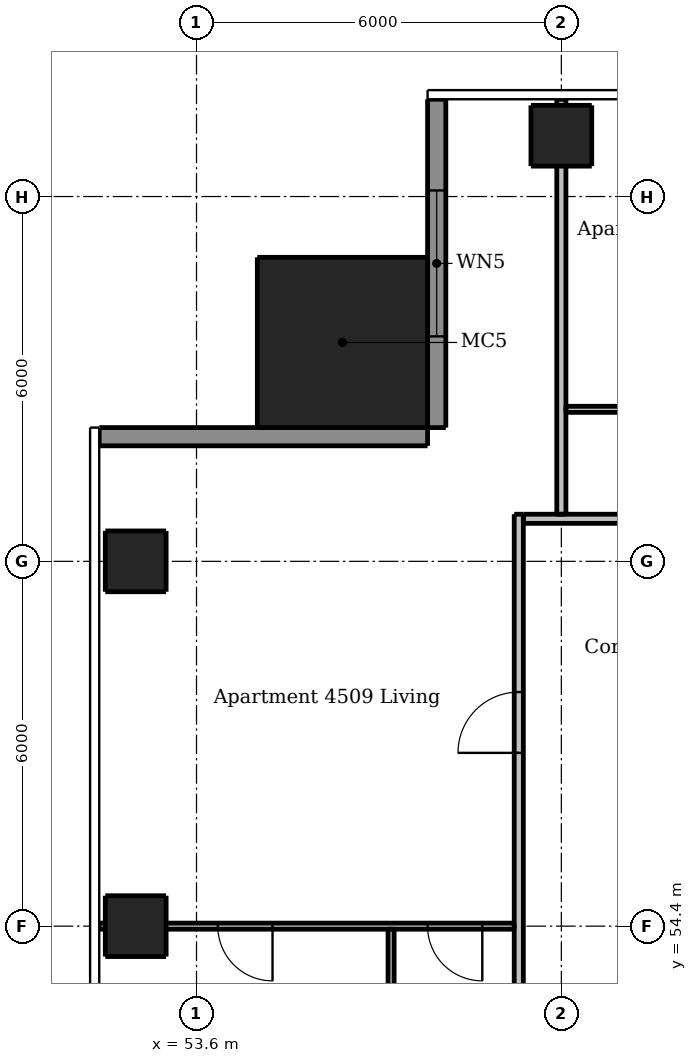
"""IFC4 building model, lengths in metres.
Left out: names, types, materials, properties, quantities, classifications, styles, units other than length and angle.
Written with IfcOpenShell. Run it as: python <this file> out.ifc"""

import sys

from ifc_helpers import new_model, si_unit, direction, frame, frame_2d, origin, origin_2d, place, context, subcontext, project, spatial, rectangle, extrude, element, fill, save


model = new_model("IFC4")
c1 = context("Model", 3, precision=1e-05, world=origin(), true_north=direction((0.0, 1.0)))
c2 = subcontext(c1, "Body", "Model", "MODEL_VIEW")
j1 = project(units=[si_unit("LENGTHUNIT", "METRE"), si_unit("PLANEANGLEUNIT", "RADIAN")], contexts=[c1])
p1 = place(None, origin())
s1 = spatial("IfcSite", under=j1, at=p1, CompositionType="ELEMENT")
p2 = place(p1, origin())
s2 = spatial("IfcBuilding", under=s1, at=p2, CompositionType="ELEMENT")
p3 = place(p2, frame((0.0, 0.0, 168.1)))
s3 = spatial("IfcBuildingStorey", under=s2, at=p3, CompositionType="ELEMENT", Elevation=168.1)
for number, where, z_axis, x_axis in (
    (1, (59.6, 67.4, 0.0), (0.0, 0.0, 1.0), (1.0, 0.0, 0.0)),
    (2, (52.6, 54.4, 0.0), (0.0, 0.0, 1.0), (1.0, 0.0, 0.0)),
    (3, (52.6, 60.4, 0.0), (0.0, 0.0, 1.0), (1.0, 0.0, 0.0)),
):
    element("IfcColumn", number, at=place(p3, frame(where, z_axis=z_axis, x_axis=x_axis)), inside=s3, PredefinedType="COLUMN", context=c2, shape_type="SweptSolid", body=[
        extrude(rectangle(XDim=1.0, YDim=1.0, at=origin_2d()), origin(), (0.0, 0.0, 1.0), 3.05),
    ])
p4 = place(p3, frame((56.0, 64.0, 0.0), z_axis=(0.0, 0.0, 1.0), x_axis=(1.0, 0.0, 0.0)))
e4 = element("IfcColumn", 4, at=p4, inside=s3, PredefinedType="COLUMN", context=c2, shape_type="SweptSolid", body=[
    extrude(rectangle(XDim=2.8, YDim=2.8, at=origin_2d()), origin(), (0.0, 0.0, 1.0), 3.3),
])
p5 = place(p3, frame((57.55, 68.0, 0.0), z_axis=(0.0, 0.0, 1.0), x_axis=(0.0, -1.0, 0.0)))
e5 = element("IfcWall", 5, at=p5, inside=s3, PredefinedType="SOLIDWALL", context=c2, shape_type="SweptSolid", body=[
    extrude(rectangle(XDim=5.4, YDim=0.3, at=frame_2d((2.7, 0.0))), origin(), (0.0, 0.0, 1.0), 3.05),
])
p6 = place(p5, frame((1.5, 0.0, 0.15)))
e6 = element("IfcOpeningElement", 6, at=p6, cuts=e5, PredefinedType="OPENING", context=c2, shape_type="SweptSolid", body=[
    extrude(rectangle(XDim=2.4, YDim=2.1, at=frame_2d((1.2, 1.05))), frame((0.0, 0.16, 0.0), z_axis=(0.0, -1.0, 0.0), x_axis=(1.0, 0.0, 0.0)), (0.0, 0.0, 1.0), 0.32),
])
p7 = place(p3, frame((57.4, 62.45, 0.0), z_axis=(0.0, 0.0, 1.0), x_axis=(-1.0, 0.0, 0.0)))
e7 = element("IfcWall", 7, at=p7, inside=s3, PredefinedType="SOLIDWALL", context=c2, shape_type="SweptSolid", body=[
    extrude(rectangle(XDim=5.4, YDim=0.3, at=frame_2d((2.7, 0.0))), origin(), (0.0, 0.0, 1.0), 3.05),
])
p8 = place(p3, frame((56.8, 54.35, 0.0), z_axis=(0.0, 0.0, 1.0), x_axis=(0.0, -1.0, 0.0)))
e8 = element("IfcWall", 8, at=p8, inside=s3, PredefinedType="PARTITIONING", context=c2, shape_type="SweptSolid", body=[
    extrude(rectangle(XDim=5.875, YDim=0.1, at=frame_2d((2.938, 0.0))), origin(), (0.0, 0.0, 1.0), 3.05),
])
p9 = place(p8, frame((3.75, 0.0, 0.0)))
e9 = element("IfcOpeningElement", 9, at=p9, cuts=e8, PredefinedType="OPENING", context=c2, shape_type="SweptSolid", body=[
    extrude(rectangle(XDim=0.8, YDim=2.1, at=frame_2d((0.4, 1.05))), frame((0.0, 0.06, 0.0), z_axis=(0.0, -1.0, 0.0), x_axis=(1.0, 0.0, 0.0)), (0.0, 0.0, 1.0), 0.12),
])
p10 = place(p3, frame((59.675, 62.9, 0.0), z_axis=(0.0, 0.0, 1.0), x_axis=(1.0, 0.0, 0.0)))
e10 = element("IfcWall", 10, at=p10, inside=s3, PredefinedType="PARTITIONING", context=c2, shape_type="SweptSolid", body=[
    extrude(rectangle(XDim=17.85, YDim=0.1, at=frame_2d((8.925, 0.0))), origin(), (0.0, 0.0, 1.0), 3.05),
])
p11 = place(p10, frame((12.375, 0.0, 0.0)))
e11 = element("IfcOpeningElement", 11, at=p11, cuts=e10, PredefinedType="OPENING", context=c2, shape_type="SweptSolid", body=[
    extrude(rectangle(XDim=0.9, YDim=2.1, at=frame_2d((0.45, 1.05))), frame((0.0, 0.06, 0.0), z_axis=(0.0, -1.0, 0.0), x_axis=(1.0, 0.0, 0.0)), (0.0, 0.0, 1.0), 0.12),
])
p12 = place(p10, frame((16.275, 0.0, 0.0)))
e12 = element("IfcOpeningElement", 12, at=p12, cuts=e10, PredefinedType="OPENING", context=c2, shape_type="SweptSolid", body=[
    extrude(rectangle(XDim=0.9, YDim=2.1, at=frame_2d((0.45, 1.05))), frame((0.0, 0.06, 0.0), z_axis=(0.0, -1.0, 0.0), x_axis=(1.0, 0.0, 0.0)), (0.0, 0.0, 1.0), 0.12),
])
p13 = place(p10, frame((14.175, 0.0, 0.0)))
e13 = element("IfcOpeningElement", 13, at=p13, cuts=e10, PredefinedType="OPENING", context=c2, shape_type="SweptSolid", body=[
    extrude(rectangle(XDim=0.9, YDim=2.1, at=frame_2d((0.45, 1.05))), frame((0.0, 0.06, 0.0), z_axis=(0.0, -1.0, 0.0), x_axis=(1.0, 0.0, 0.0)), (0.0, 0.0, 1.0), 0.12),
])
p14 = place(p10, frame((1.275, 0.0, 0.0)))
e14 = element("IfcOpeningElement", 14, at=p14, cuts=e10, PredefinedType="OPENING", context=c2, shape_type="SweptSolid", body=[
    extrude(rectangle(XDim=0.9, YDim=2.1, at=frame_2d((0.45, 1.05))), frame((0.0, 0.06, 0.0), z_axis=(0.0, -1.0, 0.0), x_axis=(1.0, 0.0, 0.0)), (0.0, 0.0, 1.0), 0.12),
])
p15 = place(p10, frame((7.275, 0.0, 0.0)))
e15 = element("IfcOpeningElement", 15, at=p15, cuts=e10, PredefinedType="OPENING", context=c2, shape_type="SweptSolid", body=[
    extrude(rectangle(XDim=0.9, YDim=2.1, at=frame_2d((0.45, 1.05))), frame((0.0, 0.06, 0.0), z_axis=(0.0, -1.0, 0.0), x_axis=(1.0, 0.0, 0.0)), (0.0, 0.0, 1.0), 0.12),
])
p16 = place(p10, frame((4.325, 0.0, 0.0)))
e16 = element("IfcOpeningElement", 16, at=p16, cuts=e10, PredefinedType="OPENING", context=c2, shape_type="SweptSolid", body=[
    extrude(rectangle(XDim=0.8, YDim=2.1, at=frame_2d((0.4, 1.05))), frame((0.0, 0.06, 0.0), z_axis=(0.0, -1.0, 0.0), x_axis=(1.0, 0.0, 0.0)), (0.0, 0.0, 1.0), 0.12),
])
p17 = place(p10, frame((10.325, 0.0, 0.0)))
e17 = element("IfcOpeningElement", 17, at=p17, cuts=e10, PredefinedType="OPENING", context=c2, shape_type="SweptSolid", body=[
    extrude(rectangle(XDim=0.8, YDim=2.1, at=frame_2d((0.4, 1.05))), frame((0.0, 0.06, 0.0), z_axis=(0.0, -1.0, 0.0), x_axis=(1.0, 0.0, 0.0)), (0.0, 0.0, 1.0), 0.12),
])
p18 = place(p3, frame((58.825, 54.4, 0.0), z_axis=(0.0, 0.0, 1.0), x_axis=(-1.0, 0.0, 0.0)))
e18 = element("IfcWall", 18, at=p18, inside=s3, PredefinedType="PARTITIONING", context=c2, shape_type="SweptSolid", body=[
    extrude(rectangle(XDim=6.825, YDim=0.1, at=frame_2d((3.413, 0.0))), origin(), (0.0, 0.0, 1.0), 2.516),
])
p19 = place(p18, frame((0.525, 0.0, 0.0)))
e19 = element("IfcOpeningElement", 19, at=p19, cuts=e18, PredefinedType="OPENING", context=c2, shape_type="SweptSolid", body=[
    extrude(rectangle(XDim=0.9, YDim=2.1, at=frame_2d((0.45, 1.05))), frame((0.0, 0.06, 0.0), z_axis=(0.0, -1.0, 0.0), x_axis=(1.0, 0.0, 0.0)), (0.0, 0.0, 1.0), 0.12),
])
p20 = place(p18, frame((3.975, 0.0, 0.0)))
e20 = element("IfcOpeningElement", 20, at=p20, cuts=e18, PredefinedType="OPENING", context=c2, shape_type="SweptSolid", body=[
    extrude(rectangle(XDim=0.9, YDim=2.1, at=frame_2d((0.45, 1.05))), frame((0.0, 0.06, 0.0), z_axis=(0.0, -1.0, 0.0), x_axis=(1.0, 0.0, 0.0)), (0.0, 0.0, 1.0), 0.12),
])
p21 = place(p3, frame((58.9, 30.325, 0.0), z_axis=(0.0, 0.0, 1.0), x_axis=(0.0, 1.0, 0.0)))
e21 = element("IfcWall", 21, at=p21, inside=s3, PredefinedType="PARTITIONING", context=c2, shape_type="SweptSolid", body=[
    extrude(rectangle(XDim=30.85, YDim=0.15, at=frame_2d((15.425, 0.0))), origin(), (0.0, 0.0, 1.0), 3.05),
])
p22 = place(p21, frame((9.225, 0.0, 0.0)))
e22 = element("IfcOpeningElement", 22, at=p22, cuts=e21, PredefinedType="OPENING", context=c2, shape_type="SweptSolid", body=[
    extrude(rectangle(XDim=1.0, YDim=2.1, at=frame_2d((0.5, 1.05))), frame((0.0, 0.085, 0.0), z_axis=(0.0, -1.0, 0.0), x_axis=(1.0, 0.0, 0.0)), (0.0, 0.0, 1.0), 0.17),
])
p23 = place(p21, frame((26.925, 0.0, 0.0)))
e23 = element("IfcOpeningElement", 23, at=p23, cuts=e21, PredefinedType="OPENING", context=c2, shape_type="SweptSolid", body=[
    extrude(rectangle(XDim=1.0, YDim=2.1, at=frame_2d((0.5, 1.05))), frame((0.0, 0.085, 0.0), z_axis=(0.0, -1.0, 0.0), x_axis=(1.0, 0.0, 0.0)), (0.0, 0.0, 1.0), 0.17),
])
p24 = place(p3, frame((59.6, 61.175, 0.0), z_axis=(0.0, 0.0, 1.0), x_axis=(0.0, 1.0, 0.0)))
e24 = element("IfcWall", 24, at=p24, inside=s3, PredefinedType="PARTITIONING", context=c2, shape_type="SweptSolid", body=[
    extrude(rectangle(XDim=6.825, YDim=0.15, at=frame_2d((3.413, 0.0))), origin(), (0.0, 0.0, 1.0), 2.51),
])
p25 = place(p3, frame((58.975, 61.1, 0.0), z_axis=(0.0, 0.0, 1.0), x_axis=(1.0, 0.0, 0.0)))
e25 = element("IfcWall", 25, at=p25, inside=s3, PredefinedType="PARTITIONING", context=c2, shape_type="SweptSolid", body=[
    extrude(rectangle(XDim=29.25, YDim=0.15, at=frame_2d((14.625, 0.0))), origin(), (0.0, 0.0, 1.0), 3.05),
])
p26 = place(p25, frame((9.125, 0.0, 0.0)))
e26 = element("IfcOpeningElement", 26, at=p26, cuts=e25, PredefinedType="OPENING", context=c2, shape_type="SweptSolid", body=[
    extrude(rectangle(XDim=1.0, YDim=2.1, at=frame_2d((0.5, 1.05))), frame((0.0, 0.085, 0.0), z_axis=(0.0, -1.0, 0.0), x_axis=(1.0, 0.0, 0.0)), (0.0, 0.0, 1.0), 0.17),
])
p27 = place(p25, frame((26.475, 0.0, 0.0)))
e27 = element("IfcOpeningElement", 27, at=p27, cuts=e25, PredefinedType="OPENING", context=c2, shape_type="SweptSolid", body=[
    extrude(rectangle(XDim=1.0, YDim=2.1, at=frame_2d((0.5, 1.05))), frame((0.0, 0.085, 0.0), z_axis=(0.0, -1.0, 0.0), x_axis=(1.0, 0.0, 0.0)), (0.0, 0.0, 1.0), 0.17),
])
p28 = place(p6, origin())
e28 = element("IfcWindow", 28, at=p28, inside=s3, PartitioningType="DOUBLE_PANEL_VERTICAL", PredefinedType="WINDOW", context=c2, shape_type="SweptSolid", body=[
    extrude(rectangle(XDim=2.4, YDim=2.1, at=frame_2d((1.2, 1.05))), frame((0.0, 0.03, 0.0), z_axis=(0.0, -1.0, 0.0), x_axis=(1.0, 0.0, 0.0)), (0.0, 0.0, 1.0), 0.06),
])
fill(e6, e28)
p29 = place(p23, origin())
e29 = element("IfcDoor", 29, at=p29, inside=s3, OperationType="SINGLE_SWING_LEFT", PredefinedType="DOOR", context=c2, shape_type="SweptSolid", body=[
    extrude(rectangle(XDim=1.0, YDim=2.1, at=frame_2d((0.5, 1.05))), frame((0.0, 0.025, 0.0), z_axis=(0.0, -1.0, 0.0), x_axis=(1.0, 0.0, 0.0)), (0.0, 0.0, 1.0), 0.05),
])
fill(e23, e29)
p30 = place(p19, origin())
e30 = element("IfcDoor", 30, at=p30, inside=s3, OperationType="SINGLE_SWING_LEFT", PredefinedType="DOOR", context=c2, shape_type="SweptSolid", body=[
    extrude(rectangle(XDim=0.9, YDim=2.1, at=frame_2d((0.45, 1.05))), frame((0.0, 0.025, 0.0), z_axis=(0.0, -1.0, 0.0), x_axis=(1.0, 0.0, 0.0)), (0.0, 0.0, 1.0), 0.05),
])
fill(e19, e30)
p31 = place(p20, origin())
e31 = element("IfcDoor", 31, at=p31, inside=s3, OperationType="SINGLE_SWING_LEFT", PredefinedType="DOOR", context=c2, shape_type="SweptSolid", body=[
    extrude(rectangle(XDim=0.9, YDim=2.1, at=frame_2d((0.45, 1.05))), frame((0.0, 0.025, 0.0), z_axis=(0.0, -1.0, 0.0), x_axis=(1.0, 0.0, 0.0)), (0.0, 0.0, 1.0), 0.05),
])
fill(e20, e31)
save(model, sys.argv[1])
